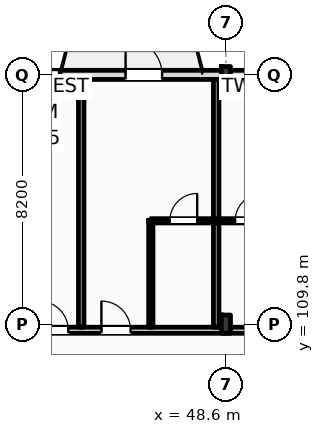
"""IFC4 building model, lengths in metres.
Left out: names, types, materials, properties, quantities, classifications, styles, units other than length and angle.
Written with IfcOpenShell. Run it as: python <this file> out.ifc"""

import sys

from ifc_helpers import new_model, si_unit, direction, frame, frame_2d, origin, origin_2d, place, context, subcontext, project, spatial, rectangle, i_section, extrude, element, fill, save


model = new_model("IFC4")
c1 = context("Model", 3, precision=1e-05, world=origin(), true_north=direction((0.0, 1.0)))
c2 = subcontext(c1, "Body", "Model", "MODEL_VIEW")
j1 = project(units=[si_unit("LENGTHUNIT", "METRE"), si_unit("PLANEANGLEUNIT", "RADIAN")], contexts=[c1])
p1 = place(None, origin())
s1 = spatial("IfcSite", under=j1, at=p1, CompositionType="ELEMENT")
p2 = place(p1, origin())
s2 = spatial("IfcBuilding", under=s1, at=p2, CompositionType="ELEMENT")
p3 = place(p2, frame((0.0, 0.0, 20.4)))
s3 = spatial("IfcBuildingStorey", under=s2, at=p3, CompositionType="ELEMENT", Elevation=20.4)
p4 = place(p3, frame((48.6, 109.8, 0.0), z_axis=(0.0, 0.0, 1.0), x_axis=(1.0, 0.0, 0.0)))
e1 = element("IfcColumn", 1, at=p4, inside=s3, PredefinedType="COLUMN", context=c2, shape_type="SweptSolid", body=[
    extrude(i_section(OverallWidth=0.3, OverallDepth=0.6, WebThickness=0.015, FlangeThickness=0.03, FilletRadius=0.027, at=origin_2d()), origin(), (0.0, 0.0, 1.0), 4.2),
])
p5 = place(p3, frame((48.6, 118.0, 0.0), z_axis=(0.0, 0.0, 1.0), x_axis=(1.0, 0.0, 0.0)))
e2 = element("IfcColumn", 2, at=p5, inside=s3, PredefinedType="COLUMN", context=c2, shape_type="SweptSolid", body=[
    extrude(i_section(OverallWidth=0.3, OverallDepth=0.55, WebThickness=0.015, FlangeThickness=0.029, FilletRadius=0.027, at=origin_2d()), origin(), (0.0, 0.0, 1.0), 4.2),
])
p6 = place(p3, frame((22.5, 118.0, 0.0), z_axis=(0.0, 0.0, 1.0), x_axis=(1.0, 0.0, 0.0)))
e3 = element("IfcWall", 3, at=p6, inside=s3, PredefinedType="STANDARD", context=c2, shape_type="SweptSolid", body=[
    extrude(rectangle(XDim=97.5, YDim=0.3, at=frame_2d((48.75, 0.0))), origin(), (0.0, 0.0, 1.0), 3.38),
])
p7 = place(p6, frame((0.91, 0.0, 0.9)))
e4 = element("IfcOpeningElement", 4, at=p7, cuts=e3, PredefinedType="OPENING", context=c2, shape_type="SweptSolid", body=[
    extrude(rectangle(XDim=0.9, YDim=1.8, at=frame_2d((0.45, 0.9))), frame((0.0, 0.16, 0.0), z_axis=(0.0, -1.0, 0.0), x_axis=(1.0, 0.0, 0.0)), (0.0, 0.0, 1.0), 0.32),
])
p8 = place(p6, frame((6.36, 0.0, 0.0)))
e5 = element("IfcOpeningElement", 5, at=p8, cuts=e3, PredefinedType="OPENING", context=c2, shape_type="SweptSolid", body=[
    extrude(rectangle(XDim=1.2, YDim=2.25, at=frame_2d((0.6, 1.125))), frame((0.0, 0.16, 0.0), z_axis=(0.0, -1.0, 0.0), x_axis=(1.0, 0.0, 0.0)), (0.0, 0.0, 1.0), 0.32),
])
p9 = place(p6, frame((11.41, 0.0, 0.9)))
e6 = element("IfcOpeningElement", 6, at=p9, cuts=e3, PredefinedType="OPENING", context=c2, shape_type="SweptSolid", body=[
    extrude(rectangle(XDim=1.1, YDim=1.9, at=frame_2d((0.55, 0.95))), frame((0.0, 0.16, 0.0), z_axis=(0.0, -1.0, 0.0), x_axis=(1.0, 0.0, 0.0)), (0.0, 0.0, 1.0), 0.32),
])
p10 = place(p6, frame((14.335, 0.0, 0.9)))
e7 = element("IfcOpeningElement", 7, at=p10, cuts=e3, PredefinedType="OPENING", context=c2, shape_type="SweptSolid", body=[
    extrude(rectangle(XDim=1.65, YDim=1.95, at=frame_2d((0.825, 0.975))), frame((0.0, 0.16, 0.0), z_axis=(0.0, -1.0, 0.0), x_axis=(1.0, 0.0, 0.0)), (0.0, 0.0, 1.0), 0.32),
])
p11 = place(p6, frame((19.26, 0.0, 0.9)))
e8 = element("IfcOpeningElement", 8, at=p11, cuts=e3, PredefinedType="OPENING", context=c2, shape_type="SweptSolid", body=[
    extrude(rectangle(XDim=1.35, YDim=2.0, at=frame_2d((0.675, 1.0))), frame((0.0, 0.16, 0.0), z_axis=(0.0, -1.0, 0.0), x_axis=(1.0, 0.0, 0.0)), (0.0, 0.0, 1.0), 0.32),
])
p12 = place(p6, frame((22.8, 0.0, 0.0)))
e9 = element("IfcOpeningElement", 9, at=p12, cuts=e3, PredefinedType="OPENING", context=c2, shape_type="SweptSolid", body=[
    extrude(rectangle(XDim=1.2, YDim=2.25, at=frame_2d((0.6, 1.125))), frame((0.0, 0.16, 0.0), z_axis=(0.0, -1.0, 0.0), x_axis=(1.0, 0.0, 0.0)), (0.0, 0.0, 1.0), 0.32),
])
p13 = place(p6, frame((26.91, 0.0, 0.9)))
e10 = element("IfcOpeningElement", 10, at=p13, cuts=e3, PredefinedType="OPENING", context=c2, shape_type="SweptSolid", body=[
    extrude(rectangle(XDim=2.1, YDim=2.1, at=frame_2d((1.05, 1.05))), frame((0.0, 0.16, 0.0), z_axis=(0.0, -1.0, 0.0), x_axis=(1.0, 0.0, 0.0)), (0.0, 0.0, 1.0), 0.32),
])
p14 = place(p6, frame((30.835, 0.0, 0.9)))
e11 = element("IfcOpeningElement", 11, at=p14, cuts=e3, PredefinedType="OPENING", context=c2, shape_type="SweptSolid", body=[
    extrude(rectangle(XDim=2.25, YDim=2.15, at=frame_2d((1.125, 1.075))), frame((0.0, 0.16, 0.0), z_axis=(0.0, -1.0, 0.0), x_axis=(1.0, 0.0, 0.0)), (0.0, 0.0, 1.0), 0.32),
])
p15 = place(p6, frame((34.96, 0.0, 0.9)))
e12 = element("IfcOpeningElement", 12, at=p15, cuts=e3, PredefinedType="OPENING", context=c2, shape_type="SweptSolid", body=[
    extrude(rectangle(XDim=2.4, YDim=2.2, at=frame_2d((1.2, 1.1))), frame((0.0, 0.16, 0.0), z_axis=(0.0, -1.0, 0.0), x_axis=(1.0, 0.0, 0.0)), (0.0, 0.0, 1.0), 0.32),
])
p16 = place(p6, frame((39.0, 0.0, 0.0)))
e13 = element("IfcOpeningElement", 13, at=p16, cuts=e3, PredefinedType="OPENING", context=c2, shape_type="SweptSolid", body=[
    extrude(rectangle(XDim=1.2, YDim=2.25, at=frame_2d((0.6, 1.125))), frame((0.0, 0.16, 0.0), z_axis=(0.0, -1.0, 0.0), x_axis=(1.0, 0.0, 0.0)), (0.0, 0.0, 1.0), 0.32),
])
p17 = place(p6, frame((43.21, 0.0, 0.9)))
e14 = element("IfcOpeningElement", 14, at=p17, cuts=e3, PredefinedType="OPENING", context=c2, shape_type="SweptSolid", body=[
    extrude(rectangle(XDim=2.7, YDim=2.3, at=frame_2d((1.35, 1.15))), frame((0.0, 0.16, 0.0), z_axis=(0.0, -1.0, 0.0), x_axis=(1.0, 0.0, 0.0)), (0.0, 0.0, 1.0), 0.32),
])
p18 = place(p6, frame((47.335, 0.0, 0.9)))
e15 = element("IfcOpeningElement", 15, at=p18, cuts=e3, PredefinedType="OPENING", context=c2, shape_type="SweptSolid", body=[
    extrude(rectangle(XDim=1.35, YDim=2.3, at=frame_2d((0.675, 1.15))), frame((0.0, 0.16, 0.0), z_axis=(0.0, -1.0, 0.0), x_axis=(1.0, 0.0, 0.0)), (0.0, 0.0, 1.0), 0.32),
])
p19 = place(p6, frame((52.74, 0.0, 0.0)))
e16 = element("IfcOpeningElement", 16, at=p19, cuts=e3, PredefinedType="OPENING", context=c2, shape_type="SweptSolid", body=[
    extrude(rectangle(XDim=1.2, YDim=2.25, at=frame_2d((0.6, 1.125))), frame((0.0, 0.16, 0.0), z_axis=(0.0, -1.0, 0.0), x_axis=(1.0, 0.0, 0.0)), (0.0, 0.0, 1.0), 0.32),
])
p20 = place(p6, frame((55.36, 0.0, 0.9)))
e17 = element("IfcOpeningElement", 17, at=p20, cuts=e3, PredefinedType="OPENING", context=c2, shape_type="SweptSolid", body=[
    extrude(rectangle(XDim=1.1, YDim=2.3, at=frame_2d((0.55, 1.15))), frame((0.0, 0.16, 0.0), z_axis=(0.0, -1.0, 0.0), x_axis=(1.0, 0.0, 0.0)), (0.0, 0.0, 1.0), 0.32),
])
p21 = place(p6, frame((59.99, 0.0, 0.9)))
e18 = element("IfcOpeningElement", 18, at=p21, cuts=e3, PredefinedType="OPENING", context=c2, shape_type="SweptSolid", body=[
    extrude(rectangle(XDim=2.74, YDim=2.3, at=frame_2d((1.37, 1.15))), frame((0.0, 0.16, 0.0), z_axis=(0.0, -1.0, 0.0), x_axis=(1.0, 0.0, 0.0)), (0.0, 0.0, 1.0), 0.32),
])
p22 = place(p6, frame((65.95, 0.0, 0.9)))
e19 = element("IfcOpeningElement", 19, at=p22, cuts=e3, PredefinedType="OPENING", context=c2, shape_type="SweptSolid", body=[
    extrude(rectangle(XDim=1.35, YDim=2.3, at=frame_2d((0.675, 1.15))), frame((0.0, 0.16, 0.0), z_axis=(0.0, -1.0, 0.0), x_axis=(1.0, 0.0, 0.0)), (0.0, 0.0, 1.0), 0.32),
])
p23 = place(p6, frame((69.16, 0.0, 0.0)))
e20 = element("IfcOpeningElement", 20, at=p23, cuts=e3, PredefinedType="OPENING", context=c2, shape_type="SweptSolid", body=[
    extrude(rectangle(XDim=1.2, YDim=2.25, at=frame_2d((0.6, 1.125))), frame((0.0, 0.16, 0.0), z_axis=(0.0, -1.0, 0.0), x_axis=(1.0, 0.0, 0.0)), (0.0, 0.0, 1.0), 0.32),
])
p24 = place(p6, frame((73.75, 0.0, 0.9)))
e21 = element("IfcOpeningElement", 21, at=p24, cuts=e3, PredefinedType="OPENING", context=c2, shape_type="SweptSolid", body=[
    extrude(rectangle(XDim=1.8, YDim=2.3, at=frame_2d((0.9, 1.15))), frame((0.0, 0.16, 0.0), z_axis=(0.0, -1.0, 0.0), x_axis=(1.0, 0.0, 0.0)), (0.0, 0.0, 1.0), 0.32),
])
p25 = place(p6, frame((76.79, 0.0, 0.9)))
e22 = element("IfcOpeningElement", 22, at=p25, cuts=e3, PredefinedType="OPENING", context=c2, shape_type="SweptSolid", body=[
    extrude(rectangle(XDim=2.74, YDim=2.3, at=frame_2d((1.37, 1.15))), frame((0.0, 0.16, 0.0), z_axis=(0.0, -1.0, 0.0), x_axis=(1.0, 0.0, 0.0)), (0.0, 0.0, 1.0), 0.32),
])
p26 = place(p6, frame((81.55, 0.0, 0.9)))
e23 = element("IfcOpeningElement", 23, at=p26, cuts=e3, PredefinedType="OPENING", context=c2, shape_type="SweptSolid", body=[
    extrude(rectangle(XDim=1.8, YDim=2.3, at=frame_2d((0.9, 1.15))), frame((0.0, 0.16, 0.0), z_axis=(0.0, -1.0, 0.0), x_axis=(1.0, 0.0, 0.0)), (0.0, 0.0, 1.0), 0.32),
])
p27 = place(p6, frame((86.01, 0.0, 0.9)))
e24 = element("IfcOpeningElement", 24, at=p27, cuts=e3, PredefinedType="OPENING", context=c2, shape_type="SweptSolid", body=[
    extrude(rectangle(XDim=1.1, YDim=1.5, at=frame_2d((0.55, 0.75))), frame((0.0, 0.16, 0.0), z_axis=(0.0, -1.0, 0.0), x_axis=(1.0, 0.0, 0.0)), (0.0, 0.0, 1.0), 0.32),
])
p28 = place(p6, frame((90.135, 0.0, 0.9)))
e25 = element("IfcOpeningElement", 25, at=p28, cuts=e3, PredefinedType="OPENING", context=c2, shape_type="SweptSolid", body=[
    extrude(rectangle(XDim=1.25, YDim=1.6, at=frame_2d((0.625, 0.8))), frame((0.0, 0.16, 0.0), z_axis=(0.0, -1.0, 0.0), x_axis=(1.0, 0.0, 0.0)), (0.0, 0.0, 1.0), 0.32),
])
p29 = place(p6, frame((94.34, 0.0, 0.9)))
e26 = element("IfcOpeningElement", 26, at=p29, cuts=e3, PredefinedType="OPENING", context=c2, shape_type="SweptSolid", body=[
    extrude(rectangle(XDim=1.4, YDim=1.7, at=frame_2d((0.7, 0.85))), frame((0.0, 0.16, 0.0), z_axis=(0.0, -1.0, 0.0), x_axis=(1.0, 0.0, 0.0)), (0.0, 0.0, 1.0), 0.32),
])
p30 = place(p3, frame((10.65, 109.6, 0.0), z_axis=(0.0, 0.0, 1.0), x_axis=(1.0, 0.0, 0.0)))
e27 = element("IfcWall", 27, at=p30, inside=s3, PredefinedType="PARTITIONING", context=c2, shape_type="SweptSolid", body=[
    extrude(rectangle(XDim=109.21, YDim=0.2, at=frame_2d((54.605, 0.0))), origin(), (0.0, 0.0, 1.0), 3.38),
])
p31 = place(p30, frame((12.535, 0.0, 0.0)))
e28 = element("IfcOpeningElement", 28, at=p31, cuts=e27, PredefinedType="OPENING", context=c2, shape_type="SweptSolid", body=[
    extrude(rectangle(XDim=1.02, YDim=2.2, at=frame_2d((0.51, 1.1))), frame((0.0, 0.11, 0.0), z_axis=(0.0, -1.0, 0.0), x_axis=(1.0, 0.0, 0.0)), (0.0, 0.0, 1.0), 0.22),
])
p32 = place(p30, frame((19.175, 0.0, 0.0)))
e29 = element("IfcOpeningElement", 29, at=p32, cuts=e27, PredefinedType="OPENING", context=c2, shape_type="SweptSolid", body=[
    extrude(rectangle(XDim=1.02, YDim=2.2, at=frame_2d((0.51, 1.1))), frame((0.0, 0.11, 0.0), z_axis=(0.0, -1.0, 0.0), x_axis=(1.0, 0.0, 0.0)), (0.0, 0.0, 1.0), 0.22),
])
p33 = place(p30, frame((23.375, 0.0, 0.0)))
e30 = element("IfcOpeningElement", 30, at=p33, cuts=e27, PredefinedType="OPENING", context=c2, shape_type="SweptSolid", body=[
    extrude(rectangle(XDim=1.02, YDim=2.2, at=frame_2d((0.51, 1.1))), frame((0.0, 0.11, 0.0), z_axis=(0.0, -1.0, 0.0), x_axis=(1.0, 0.0, 0.0)), (0.0, 0.0, 1.0), 0.22),
])
p34 = place(p30, frame((27.575, 0.0, 0.0)))
e31 = element("IfcOpeningElement", 31, at=p34, cuts=e27, PredefinedType="OPENING", context=c2, shape_type="SweptSolid", body=[
    extrude(rectangle(XDim=1.02, YDim=2.2, at=frame_2d((0.51, 1.1))), frame((0.0, 0.11, 0.0), z_axis=(0.0, -1.0, 0.0), x_axis=(1.0, 0.0, 0.0)), (0.0, 0.0, 1.0), 0.22),
])
p35 = place(p30, frame((31.805, 0.0, 0.0)))
e32 = element("IfcOpeningElement", 32, at=p35, cuts=e27, PredefinedType="OPENING", context=c2, shape_type="SweptSolid", body=[
    extrude(rectangle(XDim=0.96, YDim=2.2, at=frame_2d((0.48, 1.1))), frame((0.0, 0.11, 0.0), z_axis=(0.0, -1.0, 0.0), x_axis=(1.0, 0.0, 0.0)), (0.0, 0.0, 1.0), 0.22),
])
p36 = place(p30, frame((33.855, 0.0, 0.0)))
e33 = element("IfcOpeningElement", 33, at=p36, cuts=e27, PredefinedType="OPENING", context=c2, shape_type="SweptSolid", body=[
    extrude(rectangle(XDim=0.96, YDim=2.2, at=frame_2d((0.48, 1.1))), frame((0.0, 0.11, 0.0), z_axis=(0.0, -1.0, 0.0), x_axis=(1.0, 0.0, 0.0)), (0.0, 0.0, 1.0), 0.22),
])
p37 = place(p30, frame((40.205, 0.0, 0.0)))
e34 = element("IfcOpeningElement", 34, at=p37, cuts=e27, PredefinedType="OPENING", context=c2, shape_type="SweptSolid", body=[
    extrude(rectangle(XDim=0.96, YDim=2.2, at=frame_2d((0.48, 1.1))), frame((0.0, 0.11, 0.0), z_axis=(0.0, -1.0, 0.0), x_axis=(1.0, 0.0, 0.0)), (0.0, 0.0, 1.0), 0.22),
])
p38 = place(p30, frame((42.255, 0.0, 0.0)))
e35 = element("IfcOpeningElement", 35, at=p38, cuts=e27, PredefinedType="OPENING", context=c2, shape_type="SweptSolid", body=[
    extrude(rectangle(XDim=0.96, YDim=2.2, at=frame_2d((0.48, 1.1))), frame((0.0, 0.11, 0.0), z_axis=(0.0, -1.0, 0.0), x_axis=(1.0, 0.0, 0.0)), (0.0, 0.0, 1.0), 0.22),
])
p39 = place(p30, frame((48.605, 0.0, 0.0)))
e36 = element("IfcOpeningElement", 36, at=p39, cuts=e27, PredefinedType="OPENING", context=c2, shape_type="SweptSolid", body=[
    extrude(rectangle(XDim=0.96, YDim=2.2, at=frame_2d((0.48, 1.1))), frame((0.0, 0.11, 0.0), z_axis=(0.0, -1.0, 0.0), x_axis=(1.0, 0.0, 0.0)), (0.0, 0.0, 1.0), 0.22),
])
p40 = place(p30, frame((50.655, 0.0, 0.0)))
e37 = element("IfcOpeningElement", 37, at=p40, cuts=e27, PredefinedType="OPENING", context=c2, shape_type="SweptSolid", body=[
    extrude(rectangle(XDim=0.96, YDim=2.2, at=frame_2d((0.48, 1.1))), frame((0.0, 0.11, 0.0), z_axis=(0.0, -1.0, 0.0), x_axis=(1.0, 0.0, 0.0)), (0.0, 0.0, 1.0), 0.22),
])
p41 = place(p30, frame((57.005, 0.0, 0.0)))
e38 = element("IfcOpeningElement", 38, at=p41, cuts=e27, PredefinedType="OPENING", context=c2, shape_type="SweptSolid", body=[
    extrude(rectangle(XDim=0.96, YDim=2.2, at=frame_2d((0.48, 1.1))), frame((0.0, 0.11, 0.0), z_axis=(0.0, -1.0, 0.0), x_axis=(1.0, 0.0, 0.0)), (0.0, 0.0, 1.0), 0.22),
])
p42 = place(p30, frame((59.055, 0.0, 0.0)))
e39 = element("IfcOpeningElement", 39, at=p42, cuts=e27, PredefinedType="OPENING", context=c2, shape_type="SweptSolid", body=[
    extrude(rectangle(XDim=0.96, YDim=2.2, at=frame_2d((0.48, 1.1))), frame((0.0, 0.11, 0.0), z_axis=(0.0, -1.0, 0.0), x_axis=(1.0, 0.0, 0.0)), (0.0, 0.0, 1.0), 0.22),
])
p43 = place(p30, frame((65.405, 0.0, 0.0)))
e40 = element("IfcOpeningElement", 40, at=p43, cuts=e27, PredefinedType="OPENING", context=c2, shape_type="SweptSolid", body=[
    extrude(rectangle(XDim=0.96, YDim=2.2, at=frame_2d((0.48, 1.1))), frame((0.0, 0.11, 0.0), z_axis=(0.0, -1.0, 0.0), x_axis=(1.0, 0.0, 0.0)), (0.0, 0.0, 1.0), 0.22),
])
p44 = place(p30, frame((67.205, 0.0, 0.0)))
e41 = element("IfcOpeningElement", 41, at=p44, cuts=e27, PredefinedType="OPENING", context=c2, shape_type="SweptSolid", body=[
    extrude(rectangle(XDim=0.96, YDim=2.2, at=frame_2d((0.48, 1.1))), frame((0.0, 0.11, 0.0), z_axis=(0.0, -1.0, 0.0), x_axis=(1.0, 0.0, 0.0)), (0.0, 0.0, 1.0), 0.22),
])
p45 = place(p30, frame((73.805, 0.0, 0.0)))
e42 = element("IfcOpeningElement", 42, at=p45, cuts=e27, PredefinedType="OPENING", context=c2, shape_type="SweptSolid", body=[
    extrude(rectangle(XDim=0.96, YDim=2.2, at=frame_2d((0.48, 1.1))), frame((0.0, 0.11, 0.0), z_axis=(0.0, -1.0, 0.0), x_axis=(1.0, 0.0, 0.0)), (0.0, 0.0, 1.0), 0.22),
])
p46 = place(p30, frame((78.255, 0.0, 0.0)))
e43 = element("IfcOpeningElement", 43, at=p46, cuts=e27, PredefinedType="OPENING", context=c2, shape_type="SweptSolid", body=[
    extrude(rectangle(XDim=0.96, YDim=2.2, at=frame_2d((0.48, 1.1))), frame((0.0, 0.11, 0.0), z_axis=(0.0, -1.0, 0.0), x_axis=(1.0, 0.0, 0.0)), (0.0, 0.0, 1.0), 0.22),
])
p47 = place(p30, frame((82.205, 0.0, 0.0)))
e44 = element("IfcOpeningElement", 44, at=p47, cuts=e27, PredefinedType="OPENING", context=c2, shape_type="SweptSolid", body=[
    extrude(rectangle(XDim=0.96, YDim=2.2, at=frame_2d((0.48, 1.1))), frame((0.0, 0.11, 0.0), z_axis=(0.0, -1.0, 0.0), x_axis=(1.0, 0.0, 0.0)), (0.0, 0.0, 1.0), 0.22),
])
p48 = place(p30, frame((86.405, 0.0, 0.0)))
e45 = element("IfcOpeningElement", 45, at=p48, cuts=e27, PredefinedType="OPENING", context=c2, shape_type="SweptSolid", body=[
    extrude(rectangle(XDim=0.96, YDim=2.2, at=frame_2d((0.48, 1.1))), frame((0.0, 0.11, 0.0), z_axis=(0.0, -1.0, 0.0), x_axis=(1.0, 0.0, 0.0)), (0.0, 0.0, 1.0), 0.22),
])
p49 = place(p30, frame((90.605, 0.0, 0.0)))
e46 = element("IfcOpeningElement", 46, at=p49, cuts=e27, PredefinedType="OPENING", context=c2, shape_type="SweptSolid", body=[
    extrude(rectangle(XDim=0.96, YDim=2.2, at=frame_2d((0.48, 1.1))), frame((0.0, 0.11, 0.0), z_axis=(0.0, -1.0, 0.0), x_axis=(1.0, 0.0, 0.0)), (0.0, 0.0, 1.0), 0.22),
])
p50 = place(p30, frame((94.805, 0.0, 0.0)))
e47 = element("IfcOpeningElement", 47, at=p50, cuts=e27, PredefinedType="OPENING", context=c2, shape_type="SweptSolid", body=[
    extrude(rectangle(XDim=0.96, YDim=2.2, at=frame_2d((0.48, 1.1))), frame((0.0, 0.11, 0.0), z_axis=(0.0, -1.0, 0.0), x_axis=(1.0, 0.0, 0.0)), (0.0, 0.0, 1.0), 0.22),
])
p51 = place(p30, frame((99.005, 0.0, 0.0)))
e48 = element("IfcOpeningElement", 48, at=p51, cuts=e27, PredefinedType="OPENING", context=c2, shape_type="SweptSolid", body=[
    extrude(rectangle(XDim=0.96, YDim=2.2, at=frame_2d((0.48, 1.1))), frame((0.0, 0.11, 0.0), z_axis=(0.0, -1.0, 0.0), x_axis=(1.0, 0.0, 0.0)), (0.0, 0.0, 1.0), 0.22),
])
p52 = place(p30, frame((103.205, 0.0, 0.0)))
e49 = element("IfcOpeningElement", 49, at=p52, cuts=e27, PredefinedType="OPENING", context=c2, shape_type="SweptSolid", body=[
    extrude(rectangle(XDim=0.96, YDim=2.2, at=frame_2d((0.48, 1.1))), frame((0.0, 0.11, 0.0), z_axis=(0.0, -1.0, 0.0), x_axis=(1.0, 0.0, 0.0)), (0.0, 0.0, 1.0), 0.22),
])
p53 = place(p30, frame((105.335, 0.0, 0.0)))
e50 = element("IfcOpeningElement", 50, at=p53, cuts=e27, PredefinedType="OPENING", context=c2, shape_type="SweptSolid", body=[
    extrude(rectangle(XDim=0.96, YDim=2.2, at=frame_2d((0.48, 1.1))), frame((0.0, 0.11, 0.0), z_axis=(0.0, -1.0, 0.0), x_axis=(1.0, 0.0, 0.0)), (0.0, 0.0, 1.0), 0.22),
])
p54 = place(p30, frame((2.716, 0.0, 0.0)))
e51 = element("IfcOpeningElement", 51, at=p54, cuts=e27, PredefinedType="OPENING", context=c2, shape_type="SweptSolid", body=[
    extrude(rectangle(XDim=1.35, YDim=2.25, at=frame_2d((0.675, 1.125))), frame((0.0, 0.11, 0.0), z_axis=(0.0, -1.0, 0.0), x_axis=(1.0, 0.0, 0.0)), (0.0, 0.0, 1.0), 0.22),
])
p55 = place(p30, frame((6.65, 0.0, 0.0)))
e52 = element("IfcOpeningElement", 52, at=p55, cuts=e27, PredefinedType="OPENING", context=c2, shape_type="SweptSolid", body=[
    extrude(rectangle(XDim=1.35, YDim=2.25, at=frame_2d((0.675, 1.125))), frame((0.0, 0.11, 0.0), z_axis=(0.0, -1.0, 0.0), x_axis=(1.0, 0.0, 0.0)), (0.0, 0.0, 1.0), 0.22),
])
p56 = place(p30, frame((10.583, 0.0, 0.0)))
e53 = element("IfcOpeningElement", 53, at=p56, cuts=e27, PredefinedType="OPENING", context=c2, shape_type="SweptSolid", body=[
    extrude(rectangle(XDim=1.35, YDim=2.25, at=frame_2d((0.675, 1.125))), frame((0.0, 0.11, 0.0), z_axis=(0.0, -1.0, 0.0), x_axis=(1.0, 0.0, 0.0)), (0.0, 0.0, 1.0), 0.22),
])
for number, where, z_axis, x_axis in (
    (54, (43.84, 109.7, 0.0), (0.0, 0.0, 1.0), (0.0, 1.0, 0.0)),
    (55, (48.28, 109.7, 0.0), (0.0, 0.0, 1.0), (0.0, 1.0, 0.0)),
):
    element("IfcWall", number, at=place(p3, frame(where, z_axis=z_axis, x_axis=x_axis)), inside=s3, PredefinedType="PARTITIONING", context=c2, shape_type="SweptSolid", body=[
        extrude(rectangle(XDim=8.15, YDim=0.18, at=frame_2d((4.075, 0.0))), origin(), (0.0, 0.0, 1.0), 3.94),
    ])
p57 = place(p3, frame((46.13, 109.7, 0.0), z_axis=(0.0, 0.0, 1.0), x_axis=(0.0, 1.0, 0.0)))
e56 = element("IfcWall", 56, at=p57, inside=s3, PredefinedType="PARTITIONING", context=c2, shape_type="SweptSolid", body=[
    extrude(rectangle(XDim=3.5, YDim=0.14, at=frame_2d((1.75, 0.0))), origin(), (0.0, 0.0, 1.0), 3.63),
])
p58 = place(p3, frame((46.13, 113.2, 0.0), z_axis=(0.0, 0.0, 1.0), x_axis=(1.0, 0.0, 0.0)))
e57 = element("IfcWall", 57, at=p58, inside=s3, PredefinedType="PARTITIONING", context=c2, shape_type="SweptSolid", body=[
    extrude(rectangle(XDim=2.15, YDim=0.14, at=frame_2d((1.075, 0.0))), origin(), (0.0, 0.0, 1.0), 3.94),
])
p59 = place(p58, frame((0.625, 0.0, 0.0)))
e58 = element("IfcOpeningElement", 58, at=p59, cuts=e57, PredefinedType="OPENING", context=c2, shape_type="SweptSolid", body=[
    extrude(rectangle(XDim=0.9, YDim=2.1, at=frame_2d((0.45, 1.05))), frame((0.0, 0.08, 0.0), z_axis=(0.0, -1.0, 0.0), x_axis=(1.0, 0.0, 0.0)), (0.0, 0.0, 1.0), 0.16),
])
p60 = place(p3, frame((48.28, 113.2, 0.0), z_axis=(0.0, 0.0, 1.0), x_axis=(1.0, 0.0, 0.0)))
e59 = element("IfcWall", 59, at=p60, inside=s3, PredefinedType="PARTITIONING", context=c2, shape_type="SweptSolid", body=[
    extrude(rectangle(XDim=2.15, YDim=0.14, at=frame_2d((1.075, 0.0))), origin(), (0.0, 0.0, 1.0), 3.94),
])
p61 = place(p60, frame((0.625, 0.0, 0.0)))
e60 = element("IfcOpeningElement", 60, at=p61, cuts=e59, PredefinedType="OPENING", context=c2, shape_type="SweptSolid", body=[
    extrude(rectangle(XDim=0.9, YDim=2.1, at=frame_2d((0.45, 1.05))), frame((0.0, 0.08, 0.0), z_axis=(0.0, -1.0, 0.0), x_axis=(1.0, 0.0, 0.0)), (0.0, 0.0, 1.0), 0.16),
])
p62 = place(p11, origin())
e61 = element("IfcWindow", 61, at=p62, inside=s3, PartitioningType="DOUBLE_PANEL_VERTICAL", PredefinedType="WINDOW", context=c2, shape_type="SweptSolid", body=[
    extrude(rectangle(XDim=1.35, YDim=2.0, at=frame_2d((0.675, 1.0))), frame((0.0, 0.03, 0.0), z_axis=(0.0, -1.0, 0.0), x_axis=(1.0, 0.0, 0.0)), (0.0, 0.0, 1.0), 0.06),
])
fill(e8, e61)
p63 = place(p12, origin())
e62 = element("IfcDoor", 62, at=p63, inside=s3, OperationType="SINGLE_SWING_LEFT", PredefinedType="DOOR", context=c2, shape_type="SweptSolid", body=[
    extrude(rectangle(XDim=1.2, YDim=2.25, at=frame_2d((0.6, 1.125))), frame((0.0, 0.025, 0.0), z_axis=(0.0, -1.0, 0.0), x_axis=(1.0, 0.0, 0.0)), (0.0, 0.0, 1.0), 0.05),
])
fill(e9, e62)
p64 = place(p35, origin())
e63 = element("IfcDoor", 63, at=p64, inside=s3, OperationType="SINGLE_SWING_LEFT", PredefinedType="DOOR", context=c2, shape_type="SweptSolid", body=[
    extrude(rectangle(XDim=0.96, YDim=2.2, at=frame_2d((0.48, 1.1))), frame((0.0, 0.025, 0.0), z_axis=(0.0, -1.0, 0.0), x_axis=(1.0, 0.0, 0.0)), (0.0, 0.0, 1.0), 0.05),
])
fill(e32, e63)
p65 = place(p36, origin())
e64 = element("IfcDoor", 64, at=p65, inside=s3, OperationType="SINGLE_SWING_LEFT", PredefinedType="DOOR", context=c2, shape_type="SweptSolid", body=[
    extrude(rectangle(XDim=0.96, YDim=2.2, at=frame_2d((0.48, 1.1))), frame((0.0, 0.025, 0.0), z_axis=(0.0, -1.0, 0.0), x_axis=(1.0, 0.0, 0.0)), (0.0, 0.0, 1.0), 0.05),
])
fill(e33, e64)
p66 = place(p59, origin())
e65 = element("IfcDoor", 65, at=p66, inside=s3, OperationType="SINGLE_SWING_RIGHT", PredefinedType="DOOR", context=c2, shape_type="SweptSolid", body=[
    extrude(rectangle(XDim=0.9, YDim=2.1, at=frame_2d((0.45, 1.05))), frame((0.0, 0.025, 0.0), z_axis=(0.0, -1.0, 0.0), x_axis=(1.0, 0.0, 0.0)), (0.0, 0.0, 1.0), 0.05),
])
fill(e58, e65)
p67 = place(p61, origin())
e66 = element("IfcDoor", 66, at=p67, inside=s3, OperationType="SINGLE_SWING_RIGHT", PredefinedType="DOOR", context=c2, shape_type="SweptSolid", body=[
    extrude(rectangle(XDim=0.9, YDim=2.1, at=frame_2d((0.45, 1.05))), frame((0.0, 0.025, 0.0), z_axis=(0.0, -1.0, 0.0), x_axis=(1.0, 0.0, 0.0)), (0.0, 0.0, 1.0), 0.05),
])
fill(e60, e66)
save(model, sys.argv[1])
